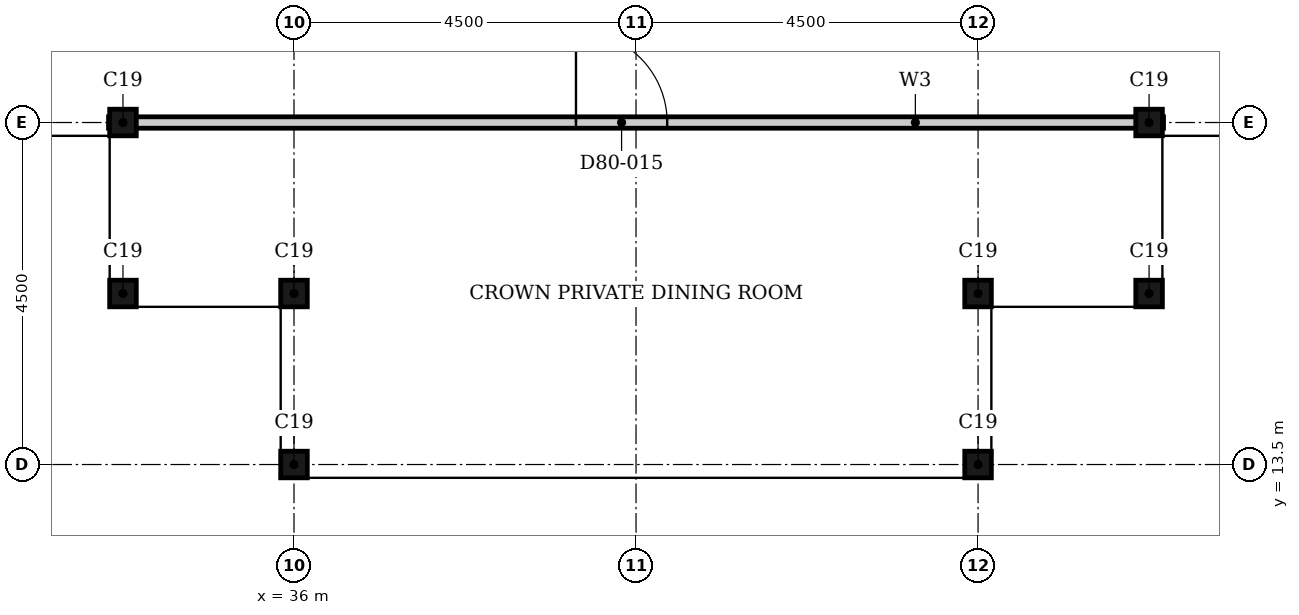
"""IFC4 building model, lengths in metres.
Left out: names, types, materials, properties, quantities, classifications, styles, units other than length and angle.
Written with IfcOpenShell. Run it as: python <this file> out.ifc"""

import sys

from ifc_helpers import new_model, si_unit, direction, frame, frame_2d, origin, origin_2d, place, context, subcontext, project, spatial, rectangle, i_section, extrude, element, fill, save


model = new_model("IFC4")
c1 = context("Model", 3, precision=1e-05, world=origin(), true_north=direction((0.0, 1.0)))
c2 = subcontext(c1, "Body", "Model", "MODEL_VIEW")
j1 = project(units=[si_unit("LENGTHUNIT", "METRE"), si_unit("PLANEANGLEUNIT", "RADIAN")], contexts=[c1])
p1 = place(None, origin())
s1 = spatial("IfcSite", under=j1, at=p1, CompositionType="ELEMENT")
p2 = place(p1, origin())
s2 = spatial("IfcBuilding", under=s1, at=p2, CompositionType="ELEMENT")
p3 = place(p2, frame((0.0, 0.0, 317.0)))
s3 = spatial("IfcBuildingStorey", under=s2, at=p3, CompositionType="ELEMENT", Elevation=317.0)
for number, where, z_axis, x_axis in (
    (1, (45.0, 13.5, 0.0), (0.0, 0.0, 1.0), (1.0, 0.0, 0.0)),
    (2, (45.0, 15.75, 0.0), (0.0, 0.0, 1.0), (1.0, 0.0, 0.0)),
    (3, (47.25, 15.75, 0.0), (0.0, 0.0, 1.0), (1.0, 0.0, 0.0)),
    (4, (47.25, 18.0, 0.0), (0.0, 0.0, 1.0), (1.0, 0.0, 0.0)),
    (5, (33.75, 18.0, 0.0), (0.0, 0.0, 1.0), (1.0, 0.0, 0.0)),
    (6, (33.75, 15.75, 0.0), (0.0, 0.0, 1.0), (1.0, 0.0, 0.0)),
    (7, (36.0, 15.75, 0.0), (0.0, 0.0, 1.0), (1.0, 0.0, 0.0)),
    (8, (36.0, 13.5, 0.0), (0.0, 0.0, 1.0), (1.0, 0.0, 0.0)),
):
    element("IfcColumn", number, at=place(p3, frame(where, z_axis=z_axis, x_axis=x_axis)), inside=s3, PredefinedType="COLUMN", context=c2, shape_type="SweptSolid", body=[
        extrude(i_section(OverallWidth=0.35, OverallDepth=0.35, WebThickness=0.012, FlangeThickness=0.019, FilletRadius=0.013, at=origin_2d()), origin(), (0.0, 0.0, 1.0), 4.2),
    ])
p4 = place(p3, frame((33.56, 18.0, 0.0), z_axis=(0.0, 0.0, 1.0), x_axis=(1.0, 0.0, 0.0)))
e9 = element("IfcWall", 9, at=p4, inside=s3, PredefinedType="PARTITIONING", context=c2, shape_type="SweptSolid", body=[
    extrude(rectangle(XDim=13.88, YDim=0.15, at=frame_2d((6.94, 0.0))), origin(), (0.0, 0.0, 1.0), 3.08),
])
p5 = place(p4, frame((6.15, 0.0, 0.0)))
e10 = element("IfcOpeningElement", 10, at=p5, cuts=e9, PredefinedType="OPENING", context=c2, shape_type="SweptSolid", body=[
    extrude(rectangle(XDim=1.2, YDim=2.4, at=frame_2d((0.6, 1.2))), frame((0.0, 0.085, 0.0), z_axis=(0.0, -1.0, 0.0), x_axis=(1.0, 0.0, 0.0)), (0.0, 0.0, 1.0), 0.17),
])
p6 = place(p5, origin())
e11 = element("IfcDoor", 11, at=p6, inside=s3, OperationType="SINGLE_SWING_RIGHT", PredefinedType="DOOR", context=c2, shape_type="SweptSolid", body=[
    extrude(rectangle(XDim=1.2, YDim=2.4, at=frame_2d((0.6, 1.2))), frame((0.0, 0.025, 0.0), z_axis=(0.0, -1.0, 0.0), x_axis=(1.0, 0.0, 0.0)), (0.0, 0.0, 1.0), 0.05),
])
fill(e10, e11)
save(model, sys.argv[1])
